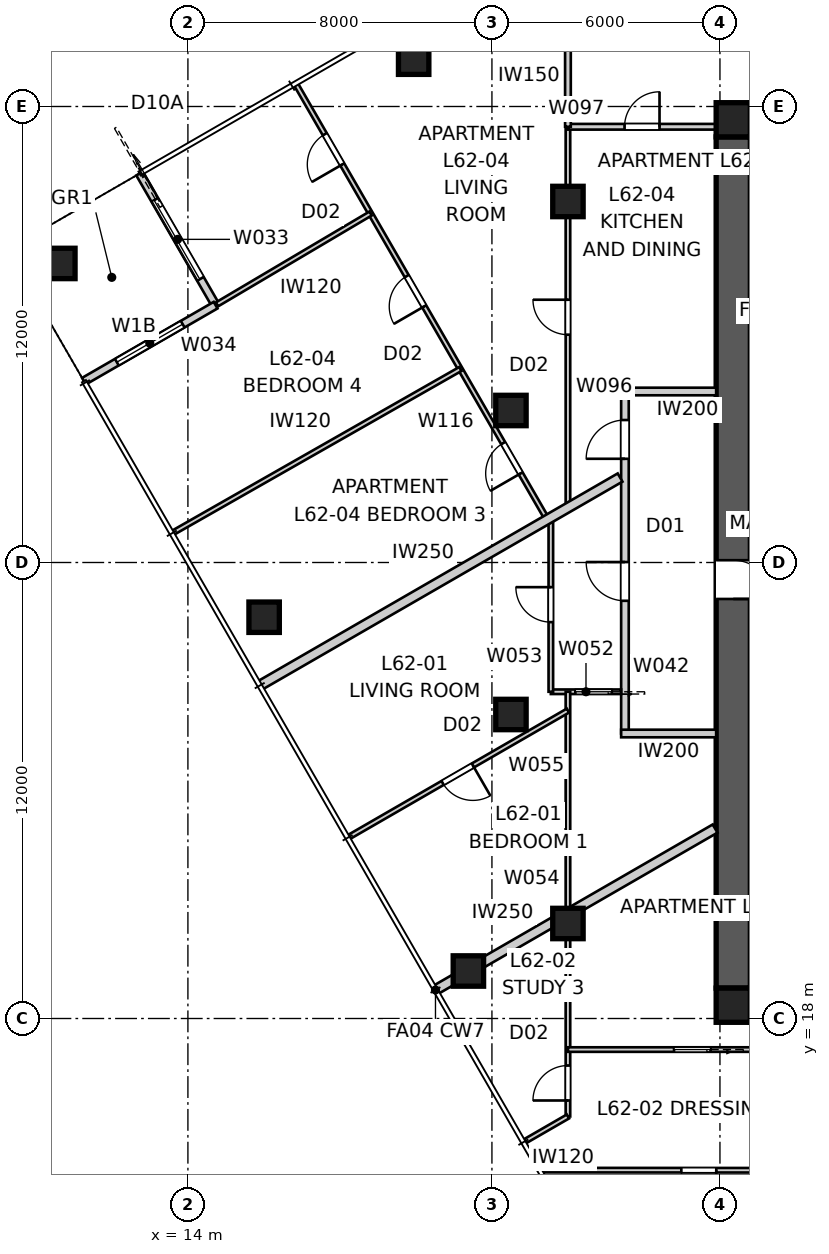
"""IFC4 building model, lengths in metres.
Left out: names, types, materials, properties, quantities, classifications, styles, units other than length and angle.
Written with IfcOpenShell. Run it as: python <this file> out.ifc"""

import sys

from ifc_helpers import new_model, si_unit, direction, frame, frame_2d, origin, origin_2d, place, context, subcontext, project, spatial, polyline, rectangle, outline, extrude, element, fill, save


model = new_model("IFC4")
c1 = context("Model", 3, precision=1e-05, world=origin(), true_north=direction((0.0, 1.0)))
c2 = subcontext(c1, "Body", "Model", "MODEL_VIEW")
j1 = project(units=[si_unit("LENGTHUNIT", "METRE"), si_unit("PLANEANGLEUNIT", "RADIAN")], contexts=[c1])
p1 = place(None, origin())
s1 = spatial("IfcSite", under=j1, at=p1, CompositionType="ELEMENT")
p2 = place(p1, origin())
s2 = spatial("IfcBuilding", under=s1, at=p2, CompositionType="ELEMENT")
p3 = place(p2, frame((0.0, 0.0, 225.2)))
s3 = spatial("IfcBuildingStorey", under=s2, at=p3, CompositionType="ELEMENT", Elevation=225.2)
for number, where, z_axis, x_axis in (
    (1, (28.8, 41.65, 0.0), (0.0, 0.0, 1.0), (1.0, 0.0, 0.0)),
    (2, (51.2, 18.35, 0.0), (0.0, 0.0, 1.0), (-1.0, 0.0, 0.0)),
):
    element("IfcWall", number, at=place(p3, frame(where, z_axis=z_axis, x_axis=x_axis)), inside=s3, PredefinedType="SHEAR", context=c2, shape_type="SweptSolid", body=[
        extrude(outline(polyline([(0.0, -0.45), (22.4, -0.45), (22.4, -0.025), (22.85, -0.025), (22.85, 0.025), (22.4, 0.025), (22.4, 0.45), (0.0, 0.45), (0.0, 0.025), (-0.45, 0.025), (-0.45, -0.025), (0.0, -0.025), (0.0, -0.45)])), origin(), (0.0, 0.0, 1.0), 3.4),
    ])
p4 = place(p3, frame((28.35, 41.2, 0.0), z_axis=(0.0, 0.0, 1.0), x_axis=(0.0, -1.0, 0.0)))
e3 = element("IfcWall", 3, at=p4, inside=s3, PredefinedType="SHEAR", context=c2, shape_type="SweptSolid", body=[
    extrude(outline(polyline([(0.0, -0.45), (22.4, -0.45), (22.4, -0.025), (22.85, -0.025), (22.85, 0.025), (22.4, 0.025), (22.4, 0.45), (0.0, 0.45), (0.0, 0.025), (-0.45, 0.025), (-0.45, -0.025), (0.0, -0.025), (0.0, -0.45)])), origin(), (0.0, 0.0, 1.0), 3.4),
])
p5 = place(p4, frame((11.14, 0.0, 0.0)))
e4 = element("IfcOpeningElement", 4, at=p5, cuts=e3, PredefinedType="OPENING", context=c2, shape_type="SweptSolid", body=[
    extrude(rectangle(XDim=1.02, YDim=2.4, at=frame_2d((0.51, 1.2))), frame((0.0, 0.46, 0.0), z_axis=(0.0, -1.0, 0.0), x_axis=(1.0, 0.0, 0.0)), (0.0, 0.0, 1.0), 0.92),
])
for number, where, z_axis, x_axis in (
    (5, (28.35, 18.35, 0.0), (0.0, 0.0, 1.0), (1.0, 0.0, 0.0)),
    (6, (28.35, 41.65, 0.0), (0.0, 0.0, 1.0), (1.0, 0.0, 0.0)),
):
    element("IfcColumn", number, at=place(p3, frame(where, z_axis=z_axis, x_axis=x_axis)), inside=s3, PredefinedType="COLUMN", context=c2, shape_type="SweptSolid", body=[
        extrude(rectangle(XDim=0.9, YDim=0.9, at=origin_2d()), origin(), (0.0, 0.0, 1.0), 3.4),
    ])
for number, where, z_axis, x_axis in (
    (7, (19.94, 43.245, 0.0), (0.0, 0.0, 1.0), (1.0, 0.0, 0.0)),
    (8, (10.63, 37.87, 0.0), (0.0, 0.0, 1.0), (1.0, 0.0, 0.0)),
    (9, (16.005, 28.56, 0.0), (0.0, 0.0, 1.0), (1.0, 0.0, 0.0)),
    (10, (21.38, 19.25, 0.0), (0.0, 0.0, 1.0), (1.0, 0.0, 0.0)),
    (11, (24.0, 39.5, 0.0), (0.0, 0.0, 1.0), (1.0, 0.0, 0.0)),
    (12, (22.5, 34.0, 0.0), (0.0, 0.0, 1.0), (1.0, 0.0, 0.0)),
    (13, (22.5, 26.0, 0.0), (0.0, 0.0, 1.0), (1.0, 0.0, 0.0)),
    (14, (24.0, 20.5, 0.0), (0.0, 0.0, 1.0), (1.0, 0.0, 0.0)),
):
    element("IfcColumn", number, at=place(p3, frame(where, z_axis=z_axis, x_axis=x_axis)), inside=s3, PredefinedType="COLUMN", context=c2, shape_type="SweptSolid", body=[
        extrude(rectangle(XDim=0.8, YDim=0.8, at=origin_2d()), origin(), (0.0, 0.0, 1.0), 3.4),
    ])
p6 = place(p3, frame((12.729, 40.236, 0.0), z_axis=(0.0, 0.0, 1.0), x_axis=(0.49999894854, -0.866026010844, 0.0)))
e15 = element("IfcWall", 15, at=p6, inside=s3, PredefinedType="SOLIDWALL", context=c2, shape_type="SweptSolid", body=[
    extrude(rectangle(XDim=4.0, YDim=0.2, at=frame_2d((2.0, 0.0))), origin(), (0.0, 0.0, 1.0), 3.25),
])
p7 = place(p6, frame((0.8, 0.0, 0.0)))
e16 = element("IfcOpeningElement", 16, at=p7, cuts=e15, PredefinedType="OPENING", context=c2, shape_type="SweptSolid", body=[
    extrude(rectangle(XDim=2.4, YDim=2.1, at=frame_2d((1.2, 1.05))), frame((0.0, 0.11, 0.0), z_axis=(0.0, -1.0, 0.0), x_axis=(1.0, 0.0, 0.0)), (0.0, 0.0, 1.0), 0.22),
])
p8 = place(p3, frame((14.729, 36.771, 0.0), z_axis=(0.0, 0.0, 1.0), x_axis=(-0.866026010844, -0.49999894854, 0.0)))
e17 = element("IfcWall", 17, at=p8, inside=s3, PredefinedType="SOLIDWALL", context=c2, shape_type="SweptSolid", body=[
    extrude(rectangle(XDim=4.0, YDim=0.2, at=frame_2d((2.0, 0.0))), origin(), (0.0, 0.0, 1.0), 3.25),
])
p9 = place(p8, frame((1.0, 0.0, 0.45)))
e18 = element("IfcOpeningElement", 18, at=p9, cuts=e17, PredefinedType="OPENING", context=c2, shape_type="SweptSolid", body=[
    extrude(rectangle(XDim=2.0, YDim=1.8, at=frame_2d((1.0, 0.9))), frame((0.0, 0.11, 0.0), z_axis=(0.0, -1.0, 0.0), x_axis=(1.0, 0.0, 0.0)), (0.0, 0.0, 1.0), 0.22),
])
p10 = place(p3, frame((25.5, 25.5, 0.0), z_axis=(0.0, 0.0, 1.0), x_axis=(0.0, 1.0, 0.0)))
e19 = element("IfcWall", 19, at=p10, inside=s3, PredefinedType="PARTITIONING", context=c2, shape_type="SweptSolid", body=[
    extrude(rectangle(XDim=9.0, YDim=0.2, at=frame_2d((4.5, 0.0))), origin(), (0.0, 0.0, 1.0), 3.25),
])
p11 = place(p10, frame((3.492, 0.0, 0.0)))
e20 = element("IfcOpeningElement", 20, at=p11, cuts=e19, PredefinedType="OPENING", context=c2, shape_type="SweptSolid", body=[
    extrude(rectangle(XDim=1.02, YDim=2.34, at=frame_2d((0.51, 1.17))), frame((0.0, 0.11, 0.0), z_axis=(0.0, -1.0, 0.0), x_axis=(1.0, 0.0, 0.0)), (0.0, 0.0, 1.0), 0.22),
])
p12 = place(p10, frame((7.229, 0.0, 0.0)))
e21 = element("IfcOpeningElement", 21, at=p12, cuts=e19, PredefinedType="OPENING", context=c2, shape_type="SweptSolid", body=[
    extrude(rectangle(XDim=1.02, YDim=2.34, at=frame_2d((0.51, 1.17))), frame((0.0, 0.11, 0.0), z_axis=(0.0, -1.0, 0.0), x_axis=(1.0, 0.0, 0.0)), (0.0, 0.0, 1.0), 0.22),
])
for number, where, z_axis, x_axis in (
    (22, (27.9, 34.5, 0.0), (0.0, 0.0, 1.0), (-1.0, 0.0, 0.0)),
    (23, (27.9, 25.5, 0.0), (0.0, 0.0, 1.0), (-1.0, 0.0, 0.0)),
):
    element("IfcWall", number, at=place(p3, frame(where, z_axis=z_axis, x_axis=x_axis)), inside=s3, PredefinedType="PARTITIONING", context=c2, shape_type="SweptSolid", body=[
        extrude(rectangle(XDim=2.5, YDim=0.2, at=frame_2d((1.25, 0.0))), origin(), (0.0, 0.0, 1.0), 3.25),
    ])
p13 = place(p3, frame((15.889, 26.761, 0.0), z_axis=(0.0, 0.0, 1.0), x_axis=(0.866024069551, 0.500002310952, 0.0)))
e24 = element("IfcWall", 24, at=p13, inside=s3, PredefinedType="PARTITIONING", context=c2, shape_type="SweptSolid", body=[
    extrude(rectangle(XDim=10.95, YDim=0.25, at=frame_2d((5.475, 0.0))), origin(), (0.0, 0.0, 1.0), 3.25),
])
p14 = place(p3, frame((20.514, 18.75, 0.0), z_axis=(0.0, 0.0, 1.0), x_axis=(0.866020489494, 0.500008511703, 0.0)))
e25 = element("IfcWall", 25, at=p14, inside=s3, PredefinedType="PARTITIONING", context=c2, shape_type="SweptSolid", body=[
    extrude(rectangle(XDim=8.496, YDim=0.25, at=frame_2d((4.248, 0.0))), origin(), (0.0, 0.0, 1.0), 3.25),
])
p15 = place(p3, frame((25.4, 26.598, 0.0), z_axis=(0.0, 0.0, 1.0), x_axis=(-1.0, 0.0, 0.0)))
e26 = element("IfcWall", 26, at=p15, inside=s3, PredefinedType="PARTITIONING", context=c2, shape_type="SweptSolid", body=[
    extrude(rectangle(XDim=1.85, YDim=0.12, at=frame_2d((0.925, 0.0))), origin(), (0.0, 0.0, 1.0), 3.25),
])
p16 = place(p15, frame((0.245, 0.0, 0.0)))
e27 = element("IfcOpeningElement", 27, at=p16, cuts=e26, PredefinedType="OPENING", context=c2, shape_type="SweptSolid", body=[
    extrude(rectangle(XDim=0.96, YDim=2.1, at=frame_2d((0.48, 1.05))), frame((0.0, 0.07, 0.0), z_axis=(0.0, -1.0, 0.0), x_axis=(1.0, 0.0, 0.0)), (0.0, 0.0, 1.0), 0.14),
])
p17 = place(p3, frame((23.55, 26.598, 0.0), z_axis=(0.0, 0.0, 1.0), x_axis=(0.0, 1.0, 0.0)))
e28 = element("IfcWall", 28, at=p17, inside=s3, PredefinedType="PARTITIONING", context=c2, shape_type="SweptSolid", body=[
    extrude(rectangle(XDim=4.585, YDim=0.12, at=frame_2d((2.292, 0.0))), origin(), (0.0, 0.0, 1.0), 3.25),
])
p18 = place(p17, frame((1.833, 0.0, 0.0)))
e29 = element("IfcOpeningElement", 29, at=p18, cuts=e28, PredefinedType="OPENING", context=c2, shape_type="SweptSolid", body=[
    extrude(rectangle(XDim=0.92, YDim=2.34, at=frame_2d((0.46, 1.17))), frame((0.0, 0.07, 0.0), z_axis=(0.0, -1.0, 0.0), x_axis=(1.0, 0.0, 0.0)), (0.0, 0.0, 1.0), 0.14),
])
p19 = place(p3, frame((24.0, 15.422, 0.0), z_axis=(0.0, 0.0, 1.0), x_axis=(0.0, 1.0, 0.0)))
e30 = element("IfcWall", 30, at=p19, inside=s3, PredefinedType="PARTITIONING", context=c2, shape_type="SweptSolid", body=[
    extrude(rectangle(XDim=11.177, YDim=0.12, at=frame_2d((5.588, 0.0))), origin(), (0.0, 0.0, 1.0), 2.55),
])
p20 = place(p19, frame((0.42, 0.0, 0.0)))
e31 = element("IfcOpeningElement", 31, at=p20, cuts=e30, PredefinedType="OPENING", context=c2, shape_type="SweptSolid", body=[
    extrude(rectangle(XDim=0.92, YDim=2.34, at=frame_2d((0.46, 1.17))), frame((0.0, 0.07, 0.0), z_axis=(0.0, -1.0, 0.0), x_axis=(1.0, 0.0, 0.0)), (0.0, 0.0, 1.0), 0.14),
])
p21 = place(p3, frame((24.0, 26.103, 0.0), z_axis=(0.0, 0.0, 1.0), x_axis=(-0.866033470286, -0.49998602815, 0.0)))
e32 = element("IfcWall", 32, at=p21, inside=s3, PredefinedType="PARTITIONING", context=c2, shape_type="SweptSolid", body=[
    extrude(rectangle(XDim=6.655, YDim=0.12, at=frame_2d((3.328, 0.0))), origin(), (0.0, 0.0, 1.0), 3.25),
])
p22 = place(p21, frame((2.887, 0.0, 0.0)))
e33 = element("IfcOpeningElement", 33, at=p22, cuts=e32, PredefinedType="OPENING", context=c2, shape_type="SweptSolid", body=[
    extrude(rectangle(XDim=0.92, YDim=2.34, at=frame_2d((0.46, 1.17))), frame((0.0, 0.07, 0.0), z_axis=(0.0, -1.0, 0.0), x_axis=(1.0, 0.0, 0.0)), (0.0, 0.0, 1.0), 0.14),
])
p23 = place(p3, frame((32.944, 17.183, 0.0), z_axis=(0.0, 0.0, 1.0), x_axis=(-1.0, 0.0, 0.0)))
e34 = element("IfcWall", 34, at=p23, inside=s3, PredefinedType="PARTITIONING", context=c2, shape_type="SweptSolid", body=[
    extrude(rectangle(XDim=8.944, YDim=0.12, at=frame_2d((4.472, 0.0))), origin(), (0.0, 0.0, 1.0), 3.25),
])
p24 = place(p23, frame((5.192, 0.0, 0.0)))
e35 = element("IfcOpeningElement", 35, at=p24, cuts=e34, PredefinedType="OPENING", context=c2, shape_type="SweptSolid", body=[
    extrude(rectangle(XDim=0.96, YDim=2.1, at=frame_2d((0.48, 1.05))), frame((0.0, 0.07, 0.0), z_axis=(0.0, -1.0, 0.0), x_axis=(1.0, 0.0, 0.0)), (0.0, 0.0, 1.0), 0.14),
])
p25 = place(p3, frame((40.217, 14.0, 0.0), z_axis=(0.0, 0.0, 1.0), x_axis=(-0.999999825002, 0.000591604877, 0.0)))
e36 = element("IfcWall", 36, at=p25, inside=s3, PredefinedType="PARTITIONING", context=c2, shape_type="SweptSolid", body=[
    extrude(rectangle(XDim=16.92, YDim=0.12, at=frame_2d((8.46, 0.0))), origin(), (0.0, 0.0, 1.0), 2.55),
])
p26 = place(p25, frame((2.14, 0.0, 0.0)))
e37 = element("IfcOpeningElement", 37, at=p26, cuts=e36, PredefinedType="OPENING", context=c2, shape_type="SweptSolid", body=[
    extrude(rectangle(XDim=0.96, YDim=2.1, at=frame_2d((0.48, 1.05))), frame((0.0, 0.07, 0.0), z_axis=(0.0, -1.0, 0.0), x_axis=(1.0, 0.0, 0.0)), (0.0, 0.0, 1.0), 0.14),
])
p27 = place(p25, frame((12.313, 0.0, 0.0)))
e38 = element("IfcOpeningElement", 38, at=p27, cuts=e36, PredefinedType="OPENING", context=c2, shape_type="SweptSolid", body=[
    extrude(rectangle(XDim=0.92, YDim=2.34, at=frame_2d((0.46, 1.17))), frame((0.0, 0.07, 0.0), z_axis=(0.0, -1.0, 0.0), x_axis=(1.0, 0.0, 0.0)), (0.0, 0.0, 1.0), 0.14),
])
p28 = place(p3, frame((22.862, 14.765, 0.0), z_axis=(0.0, 0.0, 1.0), x_axis=(0.866040225545, 0.499974327079, 0.0)))
e39 = element("IfcWall", 39, at=p28, inside=s3, PredefinedType="PARTITIONING", context=c2, shape_type="SweptSolid", body=[
    extrude(rectangle(XDim=1.314, YDim=0.12, at=frame_2d((0.657, 0.0))), origin(), (0.0, 0.0, 1.0), 3.25),
])
p29 = place(p3, frame((25.174, 10.759, 0.0), z_axis=(0.0, 0.0, 1.0), x_axis=(0.866023120914, 0.500003954026, 0.0)))
e40 = element("IfcWall", 40, at=p29, inside=s3, PredefinedType="PARTITIONING", context=c2, shape_type="SweptSolid", body=[
    extrude(rectangle(XDim=6.481, YDim=0.12, at=frame_2d((3.241, 0.0))), origin(), (0.0, 0.0, 1.0), 3.25),
])
p30 = place(p3, frame((24.0, 31.443, 0.0), z_axis=(0.0, 0.0, 1.0), x_axis=(0.0, 1.0, 0.0)))
e41 = element("IfcWall", 41, at=p30, inside=s3, PredefinedType="PARTITIONING", context=c2, shape_type="SweptSolid", body=[
    extrude(rectangle(XDim=10.023, YDim=0.12, at=frame_2d((5.012, 0.0))), origin(), (0.0, 0.0, 1.0), 2.55),
])
p31 = place(p30, frame((4.552, 0.0, 0.0)))
e42 = element("IfcOpeningElement", 42, at=p31, cuts=e41, PredefinedType="OPENING", context=c2, shape_type="SweptSolid", body=[
    extrude(rectangle(XDim=0.92, YDim=2.34, at=frame_2d((0.46, 1.17))), frame((0.0, 0.07, 0.0), z_axis=(0.0, -1.0, 0.0), x_axis=(1.0, 0.0, 0.0)), (0.0, 0.0, 1.0), 0.14),
])
p32 = place(p3, frame((24.0, 41.467, 0.0), z_axis=(0.0, 0.0, 1.0), x_axis=(1.0, 0.0, 0.0)))
e43 = element("IfcWall", 43, at=p32, inside=s3, PredefinedType="SOLIDWALL", context=c2, shape_type="SweptSolid", body=[
    extrude(rectangle(XDim=4.82, YDim=0.15, at=frame_2d((2.41, 0.0))), origin(), (0.0, 0.0, 1.0), 3.25),
])
p33 = place(p32, frame((1.49, 0.0, 0.0)))
e44 = element("IfcOpeningElement", 44, at=p33, cuts=e43, PredefinedType="OPENING", context=c2, shape_type="SweptSolid", body=[
    extrude(rectangle(XDim=0.92, YDim=2.1, at=frame_2d((0.46, 1.05))), frame((0.0, 0.085, 0.0), z_axis=(0.0, -1.0, 0.0), x_axis=(1.0, 0.0, 0.0)), (0.0, 0.0, 1.0), 0.17),
])
p34 = place(p3, frame((23.457, 31.13, 0.0), z_axis=(0.0, 0.0, 1.0), x_axis=(-0.499999220117, 0.86602585405, 0.0)))
e45 = element("IfcWall", 45, at=p34, inside=s3, PredefinedType="PARTITIONING", context=c2, shape_type="SweptSolid", body=[
    extrude(rectangle(XDim=13.21, YDim=0.12, at=frame_2d((6.605, 0.0))), origin(), (0.0, 0.0, 1.0), 3.25),
])
p35 = place(p34, frame((6.478, 0.0, 0.0)))
e46 = element("IfcOpeningElement", 46, at=p35, cuts=e45, PredefinedType="OPENING", context=c2, shape_type="SweptSolid", body=[
    extrude(rectangle(XDim=0.92, YDim=2.34, at=frame_2d((0.46, 1.17))), frame((0.0, 0.07, 0.0), z_axis=(0.0, -1.0, 0.0), x_axis=(1.0, 0.0, 0.0)), (0.0, 0.0, 1.0), 0.14),
])
p36 = place(p34, frame((1.403, 0.0, 0.0)))
e47 = element("IfcOpeningElement", 47, at=p36, cuts=e45, PredefinedType="OPENING", context=c2, shape_type="SweptSolid", body=[
    extrude(rectangle(XDim=0.92, YDim=2.34, at=frame_2d((0.46, 1.17))), frame((0.0, 0.07, 0.0), z_axis=(0.0, -1.0, 0.0), x_axis=(1.0, 0.0, 0.0)), (0.0, 0.0, 1.0), 0.14),
])
p37 = place(p34, frame((10.79, 0.0, 0.0)))
e48 = element("IfcOpeningElement", 48, at=p37, cuts=e45, PredefinedType="OPENING", context=c2, shape_type="SweptSolid", body=[
    extrude(rectangle(XDim=0.92, YDim=2.34, at=frame_2d((0.46, 1.17))), frame((0.0, 0.07, 0.0), z_axis=(0.0, -1.0, 0.0), x_axis=(1.0, 0.0, 0.0)), (0.0, 0.0, 1.0), 0.14),
])
p38 = place(p3, frame((24.0, 44.115, 0.0), z_axis=(0.0, 0.0, 1.0), x_axis=(0.0, -1.0, 0.0)))
e49 = element("IfcWall", 49, at=p38, inside=s3, PredefinedType="SOLIDWALL", context=c2, shape_type="SweptSolid", body=[
    extrude(rectangle(XDim=2.648, YDim=0.15, at=frame_2d((1.324, 0.0))), origin(), (0.0, 0.0, 1.0), 3.25),
])
p39 = place(p3, frame((13.612, 30.786, 0.0), z_axis=(0.0, 0.0, 1.0), x_axis=(0.868878086013, 0.495026132286, 0.0)))
e50 = element("IfcWall", 50, at=p39, inside=s3, PredefinedType="PARTITIONING", context=c2, shape_type="SweptSolid", body=[
    extrude(rectangle(XDim=8.698, YDim=0.12, at=frame_2d((4.349, 0.0))), origin(), (0.0, 0.0, 1.0), 3.25),
])
p40 = place(p3, frame((14.763, 36.792, 0.0), z_axis=(0.0, 0.0, 1.0), x_axis=(0.860667778588, 0.509166942073, 0.0)))
e51 = element("IfcWall", 51, at=p40, inside=s3, PredefinedType="PARTITIONING", context=c2, shape_type="SweptSolid", body=[
    extrude(rectangle(XDim=4.698, YDim=0.12, at=frame_2d((2.349, 0.0))), origin(), (0.0, 0.0, 1.0), 3.25),
])
p41 = place(p7, origin())
e52 = element("IfcDoor", 52, at=p41, inside=s3, OperationType="SLIDING_TO_LEFT", PredefinedType="DOOR", context=c2, shape_type="SweptSolid", body=[
    extrude(rectangle(XDim=2.4, YDim=2.1, at=frame_2d((1.2, 1.05))), frame((0.0, 0.025, 0.0), z_axis=(0.0, -1.0, 0.0), x_axis=(1.0, 0.0, 0.0)), (0.0, 0.0, 1.0), 0.05),
])
fill(e16, e52)
p42 = place(p9, origin())
e53 = element("IfcWindow", 53, at=p42, inside=s3, PartitioningType="SINGLE_PANEL", PredefinedType="WINDOW", context=c2, shape_type="SweptSolid", body=[
    extrude(rectangle(XDim=2.0, YDim=1.8, at=frame_2d((1.0, 0.9))), frame((0.0, 0.03, 0.0), z_axis=(0.0, -1.0, 0.0), x_axis=(1.0, 0.0, 0.0)), (0.0, 0.0, 1.0), 0.06),
])
fill(e18, e53)
p43 = place(p11, origin())
e54 = element("IfcDoor", 54, at=p43, inside=s3, OperationType="SINGLE_SWING_RIGHT", PredefinedType="DOOR", context=c2, shape_type="SweptSolid", body=[
    extrude(rectangle(XDim=1.02, YDim=2.34, at=frame_2d((0.51, 1.17))), frame((0.0, 0.025, 0.0), z_axis=(0.0, -1.0, 0.0), x_axis=(1.0, 0.0, 0.0)), (0.0, 0.0, 1.0), 0.05),
])
fill(e20, e54)
p44 = place(p12, origin())
e55 = element("IfcDoor", 55, at=p44, inside=s3, OperationType="SINGLE_SWING_LEFT", PredefinedType="DOOR", context=c2, shape_type="SweptSolid", body=[
    extrude(rectangle(XDim=1.02, YDim=2.34, at=frame_2d((0.51, 1.17))), frame((0.0, 0.025, 0.0), z_axis=(0.0, -1.0, 0.0), x_axis=(1.0, 0.0, 0.0)), (0.0, 0.0, 1.0), 0.05),
])
fill(e21, e55)
p45 = place(p18, origin())
e56 = element("IfcDoor", 56, at=p45, inside=s3, OperationType="SINGLE_SWING_RIGHT", PredefinedType="DOOR", context=c2, shape_type="SweptSolid", body=[
    extrude(rectangle(XDim=0.92, YDim=2.34, at=frame_2d((0.46, 1.17))), frame((0.0, 0.025, 0.0), z_axis=(0.0, -1.0, 0.0), x_axis=(1.0, 0.0, 0.0)), (0.0, 0.0, 1.0), 0.05),
])
fill(e29, e56)
p46 = place(p16, origin())
e57 = element("IfcDoor", 57, at=p46, inside=s3, OperationType="SLIDING_TO_LEFT", PredefinedType="DOOR", context=c2, shape_type="SweptSolid", body=[
    extrude(rectangle(XDim=0.96, YDim=2.1, at=frame_2d((0.48, 1.05))), frame((0.0, 0.025, 0.0), z_axis=(0.0, -1.0, 0.0), x_axis=(1.0, 0.0, 0.0)), (0.0, 0.0, 1.0), 0.05),
])
fill(e27, e57)
p47 = place(p31, origin())
e58 = element("IfcDoor", 58, at=p47, inside=s3, OperationType="SINGLE_SWING_RIGHT", PredefinedType="DOOR", context=c2, shape_type="SweptSolid", body=[
    extrude(rectangle(XDim=0.92, YDim=2.34, at=frame_2d((0.46, 1.17))), frame((0.0, 0.025, 0.0), z_axis=(0.0, -1.0, 0.0), x_axis=(1.0, 0.0, 0.0)), (0.0, 0.0, 1.0), 0.05),
])
fill(e42, e58)
p48 = place(p33, origin())
e59 = element("IfcDoor", 59, at=p48, inside=s3, OperationType="SINGLE_SWING_RIGHT", PredefinedType="DOOR", context=c2, shape_type="SweptSolid", body=[
    extrude(rectangle(XDim=0.92, YDim=2.1, at=frame_2d((0.46, 1.05))), frame((0.0, 0.025, 0.0), z_axis=(0.0, -1.0, 0.0), x_axis=(1.0, 0.0, 0.0)), (0.0, 0.0, 1.0), 0.05),
])
fill(e44, e59)
p49 = place(p22, origin())
e60 = element("IfcDoor", 60, at=p49, inside=s3, OperationType="SINGLE_SWING_LEFT", PredefinedType="DOOR", context=c2, shape_type="SweptSolid", body=[
    extrude(rectangle(XDim=0.92, YDim=2.34, at=frame_2d((0.46, 1.17))), frame((0.0, 0.025, 0.0), z_axis=(0.0, -1.0, 0.0), x_axis=(1.0, 0.0, 0.0)), (0.0, 0.0, 1.0), 0.05),
])
fill(e33, e60)
p50 = place(p35, origin())
e61 = element("IfcDoor", 61, at=p50, inside=s3, OperationType="SINGLE_SWING_LEFT", PredefinedType="DOOR", context=c2, shape_type="SweptSolid", body=[
    extrude(rectangle(XDim=0.92, YDim=2.34, at=frame_2d((0.46, 1.17))), frame((0.0, 0.025, 0.0), z_axis=(0.0, -1.0, 0.0), x_axis=(1.0, 0.0, 0.0)), (0.0, 0.0, 1.0), 0.05),
])
fill(e46, e61)
p51 = place(p36, origin())
e62 = element("IfcDoor", 62, at=p51, inside=s3, OperationType="SINGLE_SWING_LEFT", PredefinedType="DOOR", context=c2, shape_type="SweptSolid", body=[
    extrude(rectangle(XDim=0.92, YDim=2.34, at=frame_2d((0.46, 1.17))), frame((0.0, 0.025, 0.0), z_axis=(0.0, -1.0, 0.0), x_axis=(1.0, 0.0, 0.0)), (0.0, 0.0, 1.0), 0.05),
])
fill(e47, e62)
p52 = place(p37, origin())
e63 = element("IfcDoor", 63, at=p52, inside=s3, OperationType="SINGLE_SWING_LEFT", PredefinedType="DOOR", context=c2, shape_type="SweptSolid", body=[
    extrude(rectangle(XDim=0.92, YDim=2.34, at=frame_2d((0.46, 1.17))), frame((0.0, 0.025, 0.0), z_axis=(0.0, -1.0, 0.0), x_axis=(1.0, 0.0, 0.0)), (0.0, 0.0, 1.0), 0.05),
])
fill(e48, e63)
p53 = place(p24, origin())
e64 = element("IfcDoor", 64, at=p53, inside=s3, OperationType="SLIDING_TO_LEFT", PredefinedType="DOOR", context=c2, shape_type="SweptSolid", body=[
    extrude(rectangle(XDim=0.96, YDim=2.1, at=frame_2d((0.48, 1.05))), frame((0.0, 0.025, 0.0), z_axis=(0.0, -1.0, 0.0), x_axis=(1.0, 0.0, 0.0)), (0.0, 0.0, 1.0), 0.05),
])
fill(e35, e64)
p54 = place(p27, origin())
e65 = element("IfcDoor", 65, at=p54, inside=s3, OperationType="SINGLE_SWING_LEFT", PredefinedType="DOOR", context=c2, shape_type="SweptSolid", body=[
    extrude(rectangle(XDim=0.92, YDim=2.34, at=frame_2d((0.46, 1.17))), frame((0.0, 0.025, 0.0), z_axis=(0.0, -1.0, 0.0), x_axis=(1.0, 0.0, 0.0)), (0.0, 0.0, 1.0), 0.05),
])
fill(e38, e65)
p55 = place(p20, origin())
e66 = element("IfcDoor", 66, at=p55, inside=s3, OperationType="SINGLE_SWING_LEFT", PredefinedType="DOOR", context=c2, shape_type="SweptSolid", body=[
    extrude(rectangle(XDim=0.92, YDim=2.34, at=frame_2d((0.46, 1.17))), frame((0.0, 0.025, 0.0), z_axis=(0.0, -1.0, 0.0), x_axis=(1.0, 0.0, 0.0)), (0.0, 0.0, 1.0), 0.05),
])
fill(e31, e66)
p56 = place(p5, origin())
e67 = element("IfcDoor", 67, at=p56, inside=s3, OperationType="SINGLE_SWING_RIGHT", PredefinedType="DOOR", context=c2, shape_type="SweptSolid", body=[
    extrude(rectangle(XDim=1.02, YDim=2.4, at=frame_2d((0.51, 1.2))), frame((0.0, 0.025, 0.0), z_axis=(0.0, -1.0, 0.0), x_axis=(1.0, 0.0, 0.0)), (0.0, 0.0, 1.0), 0.05),
])
fill(e4, e67)
save(model, sys.argv[1])
